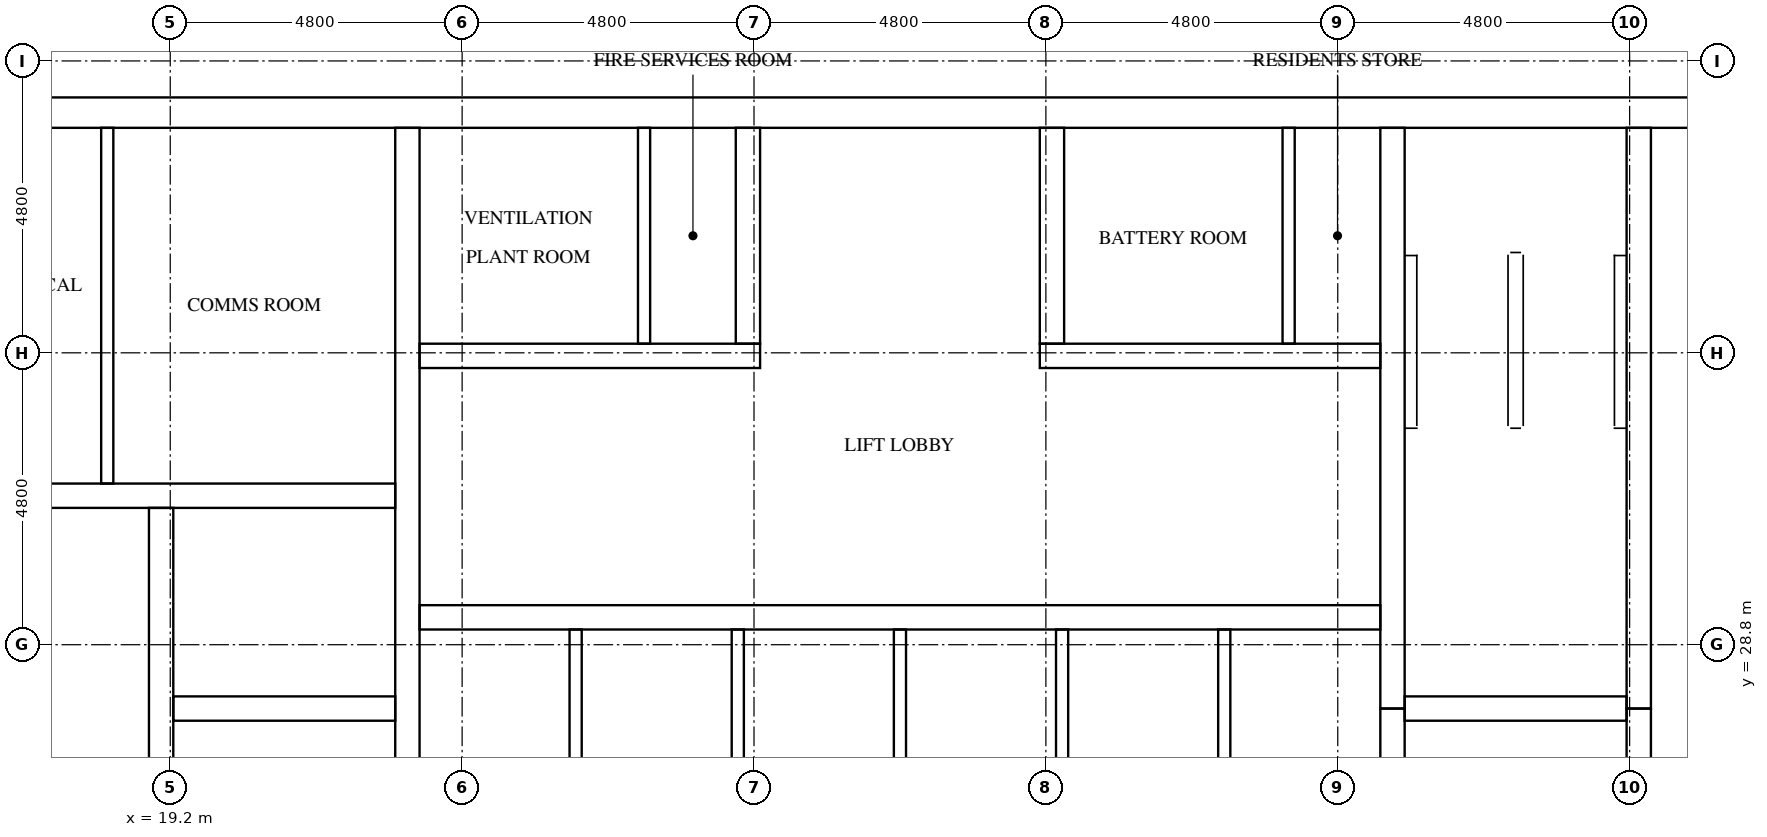
"""IFC4 building model, lengths in metres.
Left out: names, types, materials, properties, quantities, classifications, styles, units other than length and angle.
Written with IfcOpenShell. Run it as: python <this file> out.ifc"""

import sys

from ifc_helpers import new_model, si_unit, direction, frame, frame_2d, origin, place, context, subcontext, project, spatial, rectangle, extrude, element, fill, save


model = new_model("IFC4")
c1 = context("Model", 3, precision=1e-05, world=origin(), true_north=direction((0.0, 1.0)))
c2 = subcontext(c1, "Body", "Model", "MODEL_VIEW")
j1 = project(units=[si_unit("LENGTHUNIT", "METRE"), si_unit("PLANEANGLEUNIT", "RADIAN")], contexts=[c1])
p1 = place(None, origin())
s1 = spatial("IfcSite", under=j1, at=p1, CompositionType="ELEMENT")
p2 = place(p1, origin())
s2 = spatial("IfcBuilding", under=s1, at=p2, CompositionType="ELEMENT")
p3 = place(p2, frame((0.0, 0.0, 282.6)))
s3 = spatial("IfcBuildingStorey", under=s2, at=p3, CompositionType="ELEMENT", Elevation=282.6)
p4 = place(p3, frame((15.0, 37.55, 0.0), z_axis=(0.0, 0.0, 1.0), x_axis=(1.0, 0.0, 0.0)))
e1 = element("IfcWall", 1, at=p4, inside=s3, PredefinedType="SHEAR", context=c2, shape_type="SweptSolid", body=[
    extrude(rectangle(XDim=32.4, YDim=0.5, at=frame_2d((16.2, 0.0))), origin(), (0.0, 0.0, 1.0), 3.2),
])
p5 = place(p4, frame((15.3, 0.0, 0.0)))
e2 = element("IfcOpeningElement", 2, at=p5, cuts=e1, PredefinedType="OPENING", context=c2, shape_type="SweptSolid", body=[
    extrude(rectangle(XDim=1.8, YDim=2.1, at=frame_2d((0.9, 1.05))), frame((0.0, 0.26, 0.0), z_axis=(0.0, -1.0, 0.0), x_axis=(1.0, 0.0, 0.0)), (0.0, 0.0, 1.0), 0.52),
])
p6 = place(p4, frame((1.282, 0.0, 0.0)))
e3 = element("IfcOpeningElement", 3, at=p6, cuts=e1, PredefinedType="OPENING", context=c2, shape_type="SweptSolid", body=[
    extrude(rectangle(XDim=1.0, YDim=2.1, at=frame_2d((0.5, 1.05))), frame((0.0, 0.26, 0.0), z_axis=(0.0, -1.0, 0.0), x_axis=(1.0, 0.0, 0.0)), (0.0, 0.0, 1.0), 0.52),
])
p7 = place(p4, frame((5.082, 0.0, 0.0)))
e4 = element("IfcOpeningElement", 4, at=p7, cuts=e1, PredefinedType="OPENING", context=c2, shape_type="SweptSolid", body=[
    extrude(rectangle(XDim=1.0, YDim=2.1, at=frame_2d((0.5, 1.05))), frame((0.0, 0.26, 0.0), z_axis=(0.0, -1.0, 0.0), x_axis=(1.0, 0.0, 0.0)), (0.0, 0.0, 1.0), 0.52),
])
p8 = place(p3, frame((19.05, 15.5, 0.0), z_axis=(0.0, 0.0, 1.0), x_axis=(0.0, 1.0, 0.0)))
e5 = element("IfcWall", 5, at=p8, inside=s3, PredefinedType="SHEAR", context=c2, shape_type="SweptSolid", body=[
    extrude(rectangle(XDim=15.55, YDim=0.4, at=frame_2d((7.775, 0.0))), origin(), (0.0, 0.0, 1.0), 3.2),
])
p9 = place(p8, frame((9.95, 0.0, 0.0)))
e6 = element("IfcOpeningElement", 6, at=p9, cuts=e5, PredefinedType="OPENING", context=c2, shape_type="SweptSolid", body=[
    extrude(rectangle(XDim=1.1, YDim=2.1, at=frame_2d((0.55, 1.05))), frame((0.0, 0.21, 0.0), z_axis=(0.0, -1.0, 0.0), x_axis=(1.0, 0.0, 0.0)), (0.0, 0.0, 1.0), 0.42),
])
p10 = place(p8, frame((13.45, 0.0, 0.0)))
e7 = element("IfcOpeningElement", 7, at=p10, cuts=e5, PredefinedType="OPENING", context=c2, shape_type="SweptSolid", body=[
    extrude(rectangle(XDim=1.1, YDim=2.1, at=frame_2d((0.55, 1.05))), frame((0.0, 0.21, 0.0), z_axis=(0.0, -1.0, 0.0), x_axis=(1.0, 0.0, 0.0)), (0.0, 0.0, 1.0), 0.42),
])
p11 = place(p8, frame((0.7, 0.0, 0.0)))
e8 = element("IfcOpeningElement", 8, at=p11, cuts=e5, PredefinedType="OPENING", context=c2, shape_type="SweptSolid", body=[
    extrude(rectangle(XDim=1.2, YDim=2.1, at=frame_2d((0.6, 1.05))), frame((0.0, 0.21, 0.0), z_axis=(0.0, -1.0, 0.0), x_axis=(1.0, 0.0, 0.0)), (0.0, 0.0, 1.0), 0.42),
])
p12 = place(p3, frame((23.1, 15.5, 0.0), z_axis=(0.0, 0.0, 1.0), x_axis=(0.0, 1.0, 0.0)))
e9 = element("IfcWall", 9, at=p12, inside=s3, PredefinedType="SHEAR", context=c2, shape_type="SweptSolid", body=[
    extrude(rectangle(XDim=21.8, YDim=0.4, at=frame_2d((10.9, 0.0))), origin(), (0.0, 0.0, 1.0), 3.2),
])
p13 = place(p3, frame((39.3, 24.25, 0.0), z_axis=(0.0, 0.0, 1.0), x_axis=(0.0, 1.0, 0.0)))
e10 = element("IfcWall", 10, at=p13, inside=s3, PredefinedType="SHEAR", context=c2, shape_type="SweptSolid", body=[
    extrude(rectangle(XDim=3.5, YDim=0.4, at=frame_2d((1.75, 0.0))), origin(), (0.0, 0.0, 1.0), 3.2),
])
p14 = place(p3, frame((39.3, 27.75, 0.0), z_axis=(0.0, 0.0, 1.0), x_axis=(0.0, 1.0, 0.0)))
e11 = element("IfcWall", 11, at=p14, inside=s3, PredefinedType="SHEAR", context=c2, shape_type="SweptSolid", body=[
    extrude(rectangle(XDim=9.55, YDim=0.4, at=frame_2d((4.775, 0.0))), origin(), (0.0, 0.0, 1.0), 3.2),
])
p15 = place(p3, frame((43.35, 24.25, 0.0), z_axis=(0.0, 0.0, 1.0), x_axis=(0.0, 1.0, 0.0)))
e12 = element("IfcWall", 12, at=p15, inside=s3, PredefinedType="SHEAR", context=c2, shape_type="SweptSolid", body=[
    extrude(rectangle(XDim=3.5, YDim=0.4, at=frame_2d((1.75, 0.0))), origin(), (0.0, 0.0, 1.0), 3.2),
])
p16 = place(p15, frame((1.2, 0.0, 0.0)))
e13 = element("IfcOpeningElement", 13, at=p16, cuts=e12, PredefinedType="OPENING", context=c2, shape_type="SweptSolid", body=[
    extrude(rectangle(XDim=1.1, YDim=2.1, at=frame_2d((0.55, 1.05))), frame((0.0, 0.21, 0.0), z_axis=(0.0, -1.0, 0.0), x_axis=(1.0, 0.0, 0.0)), (0.0, 0.0, 1.0), 0.42),
])
p17 = place(p3, frame((43.35, 27.75, 0.0), z_axis=(0.0, 0.0, 1.0), x_axis=(0.0, 1.0, 0.0)))
e14 = element("IfcWall", 14, at=p17, inside=s3, PredefinedType="SHEAR", context=c2, shape_type="SweptSolid", body=[
    extrude(rectangle(XDim=9.55, YDim=0.4, at=frame_2d((4.775, 0.0))), origin(), (0.0, 0.0, 1.0), 3.2),
])
p18 = place(p17, frame((7.65, 0.0, 0.0)))
e15 = element("IfcOpeningElement", 15, at=p18, cuts=e14, PredefinedType="OPENING", context=c2, shape_type="SweptSolid", body=[
    extrude(rectangle(XDim=1.2, YDim=2.1, at=frame_2d((0.6, 1.05))), frame((0.0, 0.21, 0.0), z_axis=(0.0, -1.0, 0.0), x_axis=(1.0, 0.0, 0.0)), (0.0, 0.0, 1.0), 0.42),
])
p19 = place(p3, frame((19.25, 27.75, 0.0), z_axis=(0.0, 0.0, 1.0), x_axis=(1.0, 0.0, 0.0)))
e16 = element("IfcWall", 16, at=p19, inside=s3, PredefinedType="SHEAR", context=c2, shape_type="SweptSolid", body=[
    extrude(rectangle(XDim=3.65, YDim=0.4, at=frame_2d((1.825, 0.0))), origin(), (0.0, 0.0, 1.0), 3.2),
])
p20 = place(p3, frame((15.5, 31.25, 0.0), z_axis=(0.0, 0.0, 1.0), x_axis=(1.0, 0.0, 0.0)))
e17 = element("IfcWall", 17, at=p20, inside=s3, PredefinedType="SHEAR", context=c2, shape_type="SweptSolid", body=[
    extrude(rectangle(XDim=7.4, YDim=0.4, at=frame_2d((3.7, 0.0))), origin(), (0.0, 0.0, 1.0), 3.2),
])
p21 = place(p3, frame((39.5, 27.75, 0.0), z_axis=(0.0, 0.0, 1.0), x_axis=(1.0, 0.0, 0.0)))
e18 = element("IfcWall", 18, at=p21, inside=s3, PredefinedType="SHEAR", context=c2, shape_type="SweptSolid", body=[
    extrude(rectangle(XDim=3.65, YDim=0.4, at=frame_2d((1.825, 0.0))), origin(), (0.0, 0.0, 1.0), 3.2),
])
p22 = place(p3, frame((23.3, 29.25, 0.0), z_axis=(0.0, 0.0, 1.0), x_axis=(1.0, 0.0, 0.0)))
e19 = element("IfcWall", 19, at=p22, inside=s3, PredefinedType="SHEAR", context=c2, shape_type="SweptSolid", body=[
    extrude(rectangle(XDim=15.8, YDim=0.4, at=frame_2d((7.9, 0.0))), origin(), (0.0, 0.0, 1.0), 3.2),
])
p23 = place(p22, frame((0.683, 0.0, 0.0)))
e20 = element("IfcOpeningElement", 20, at=p23, cuts=e19, PredefinedType="OPENING", context=c2, shape_type="SweptSolid", body=[
    extrude(rectangle(XDim=1.1, YDim=2.1, at=frame_2d((0.55, 1.05))), frame((0.0, 0.21, 0.0), z_axis=(0.0, -1.0, 0.0), x_axis=(1.0, 0.0, 0.0)), (0.0, 0.0, 1.0), 0.42),
])
p24 = place(p22, frame((3.35, 0.0, 0.0)))
e21 = element("IfcOpeningElement", 21, at=p24, cuts=e19, PredefinedType="OPENING", context=c2, shape_type="SweptSolid", body=[
    extrude(rectangle(XDim=1.1, YDim=2.1, at=frame_2d((0.55, 1.05))), frame((0.0, 0.21, 0.0), z_axis=(0.0, -1.0, 0.0), x_axis=(1.0, 0.0, 0.0)), (0.0, 0.0, 1.0), 0.42),
])
p25 = place(p22, frame((6.017, 0.0, 0.0)))
e22 = element("IfcOpeningElement", 22, at=p25, cuts=e19, PredefinedType="OPENING", context=c2, shape_type="SweptSolid", body=[
    extrude(rectangle(XDim=1.1, YDim=2.1, at=frame_2d((0.55, 1.05))), frame((0.0, 0.21, 0.0), z_axis=(0.0, -1.0, 0.0), x_axis=(1.0, 0.0, 0.0)), (0.0, 0.0, 1.0), 0.42),
])
p26 = place(p22, frame((8.683, 0.0, 0.0)))
e23 = element("IfcOpeningElement", 23, at=p26, cuts=e19, PredefinedType="OPENING", context=c2, shape_type="SweptSolid", body=[
    extrude(rectangle(XDim=1.1, YDim=2.1, at=frame_2d((0.55, 1.05))), frame((0.0, 0.21, 0.0), z_axis=(0.0, -1.0, 0.0), x_axis=(1.0, 0.0, 0.0)), (0.0, 0.0, 1.0), 0.42),
])
p27 = place(p22, frame((11.35, 0.0, 0.0)))
e24 = element("IfcOpeningElement", 24, at=p27, cuts=e19, PredefinedType="OPENING", context=c2, shape_type="SweptSolid", body=[
    extrude(rectangle(XDim=1.1, YDim=2.1, at=frame_2d((0.55, 1.05))), frame((0.0, 0.21, 0.0), z_axis=(0.0, -1.0, 0.0), x_axis=(1.0, 0.0, 0.0)), (0.0, 0.0, 1.0), 0.42),
])
p28 = place(p22, frame((14.017, 0.0, 0.0)))
e25 = element("IfcOpeningElement", 25, at=p28, cuts=e19, PredefinedType="OPENING", context=c2, shape_type="SweptSolid", body=[
    extrude(rectangle(XDim=1.1, YDim=2.1, at=frame_2d((0.55, 1.05))), frame((0.0, 0.21, 0.0), z_axis=(0.0, -1.0, 0.0), x_axis=(1.0, 0.0, 0.0)), (0.0, 0.0, 1.0), 0.42),
])
p29 = place(p3, frame((23.3, 33.55, 0.0), z_axis=(0.0, 0.0, 1.0), x_axis=(1.0, 0.0, 0.0)))
e26 = element("IfcWall", 26, at=p29, inside=s3, PredefinedType="SHEAR", context=c2, shape_type="SweptSolid", body=[
    extrude(rectangle(XDim=5.6, YDim=0.4, at=frame_2d((2.8, 0.0))), origin(), (0.0, 0.0, 1.0), 3.2),
])
p30 = place(p29, frame((1.296, 0.0, 0.0)))
e27 = element("IfcOpeningElement", 27, at=p30, cuts=e26, PredefinedType="OPENING", context=c2, shape_type="SweptSolid", body=[
    extrude(rectangle(XDim=1.0, YDim=2.1, at=frame_2d((0.5, 1.05))), frame((0.0, 0.21, 0.0), z_axis=(0.0, -1.0, 0.0), x_axis=(1.0, 0.0, 0.0)), (0.0, 0.0, 1.0), 0.42),
])
p31 = place(p29, frame((3.996, 0.0, 0.0)))
e28 = element("IfcOpeningElement", 28, at=p31, cuts=e26, PredefinedType="OPENING", context=c2, shape_type="SweptSolid", body=[
    extrude(rectangle(XDim=1.0, YDim=2.1, at=frame_2d((0.5, 1.05))), frame((0.0, 0.21, 0.0), z_axis=(0.0, -1.0, 0.0), x_axis=(1.0, 0.0, 0.0)), (0.0, 0.0, 1.0), 0.42),
])
p32 = place(p3, frame((33.5, 33.55, 0.0), z_axis=(0.0, 0.0, 1.0), x_axis=(1.0, 0.0, 0.0)))
e29 = element("IfcWall", 29, at=p32, inside=s3, PredefinedType="SHEAR", context=c2, shape_type="SweptSolid", body=[
    extrude(rectangle(XDim=5.6, YDim=0.4, at=frame_2d((2.8, 0.0))), origin(), (0.0, 0.0, 1.0), 3.2),
])
p33 = place(p32, frame((1.696, 0.0, 0.0)))
e30 = element("IfcOpeningElement", 30, at=p33, cuts=e29, PredefinedType="OPENING", context=c2, shape_type="SweptSolid", body=[
    extrude(rectangle(XDim=1.0, YDim=2.1, at=frame_2d((0.5, 1.05))), frame((0.0, 0.21, 0.0), z_axis=(0.0, -1.0, 0.0), x_axis=(1.0, 0.0, 0.0)), (0.0, 0.0, 1.0), 0.42),
])
p34 = place(p32, frame((4.396, 0.0, 0.0)))
e31 = element("IfcOpeningElement", 31, at=p34, cuts=e29, PredefinedType="OPENING", context=c2, shape_type="SweptSolid", body=[
    extrude(rectangle(XDim=1.0, YDim=2.1, at=frame_2d((0.5, 1.05))), frame((0.0, 0.21, 0.0), z_axis=(0.0, -1.0, 0.0), x_axis=(1.0, 0.0, 0.0)), (0.0, 0.0, 1.0), 0.42),
])
for number, where, z_axis, x_axis in (
    (32, (28.7, 33.75, 0.0), (0.0, 0.0, 1.0), (0.0, 1.0, 0.0)),
    (33, (33.7, 33.75, 0.0), (0.0, 0.0, 1.0), (0.0, 1.0, 0.0)),
):
    element("IfcWall", number, at=place(p3, frame(where, z_axis=z_axis, x_axis=x_axis)), inside=s3, PredefinedType="SHEAR", context=c2, shape_type="SweptSolid", body=[
        extrude(rectangle(XDim=3.55, YDim=0.4, at=frame_2d((1.775, 0.0))), origin(), (0.0, 0.0, 1.0), 3.2),
    ])
for number, where, z_axis, x_axis in (
    (34, (25.867, 26.35, 0.0), (0.0, 0.0, 1.0), (0.0, 1.0, 0.0)),
    (35, (28.533, 26.35, 0.0), (0.0, 0.0, 1.0), (0.0, 1.0, 0.0)),
    (36, (31.2, 26.35, 0.0), (0.0, 0.0, 1.0), (0.0, 1.0, 0.0)),
    (37, (33.867, 26.35, 0.0), (0.0, 0.0, 1.0), (0.0, 1.0, 0.0)),
    (38, (36.533, 26.35, 0.0), (0.0, 0.0, 1.0), (0.0, 1.0, 0.0)),
):
    element("IfcWall", number, at=place(p3, frame(where, z_axis=z_axis, x_axis=x_axis)), inside=s3, PredefinedType="SOLIDWALL", context=c2, shape_type="SweptSolid", body=[
        extrude(rectangle(XDim=2.7, YDim=0.2, at=frame_2d((1.35, 0.0))), origin(), (0.0, 0.0, 1.0), 3.2),
    ])
p35 = place(p3, frame((18.164, 31.45, 0.0), z_axis=(0.0, 0.0, 1.0), x_axis=(0.0, 1.0, 0.0)))
e39 = element("IfcWall", 39, at=p35, inside=s3, PredefinedType="PARTITIONING", context=c2, shape_type="SweptSolid", body=[
    extrude(rectangle(XDim=5.85, YDim=0.2, at=frame_2d((2.925, 0.0))), origin(), (0.0, 0.0, 1.0), 3.2),
])
for number, where, z_axis, x_axis in (
    (40, (26.992, 33.75, 0.0), (0.0, 0.0, 1.0), (0.0, 1.0, 0.0)),
    (41, (37.592, 33.75, 0.0), (0.0, 0.0, 1.0), (0.0, 1.0, 0.0)),
):
    element("IfcWall", number, at=place(p3, frame(where, z_axis=z_axis, x_axis=x_axis)), inside=s3, PredefinedType="PARTITIONING", context=c2, shape_type="SweptSolid", body=[
        extrude(rectangle(XDim=3.55, YDim=0.2, at=frame_2d((1.775, 0.0))), origin(), (0.0, 0.0, 1.0), 3.2),
    ])
p36 = place(p23, origin())
e42 = element("IfcDoor", 42, at=p36, inside=s3, OperationType="DOUBLE_DOOR_SLIDING", PredefinedType="DOOR", context=c2, shape_type="SweptSolid", body=[
    extrude(rectangle(XDim=1.1, YDim=2.1, at=frame_2d((0.55, 1.05))), frame((0.0, 0.025, 0.0), z_axis=(0.0, -1.0, 0.0), x_axis=(1.0, 0.0, 0.0)), (0.0, 0.0, 1.0), 0.05),
])
fill(e20, e42)
p37 = place(p24, origin())
e43 = element("IfcDoor", 43, at=p37, inside=s3, OperationType="DOUBLE_DOOR_SLIDING", PredefinedType="DOOR", context=c2, shape_type="SweptSolid", body=[
    extrude(rectangle(XDim=1.1, YDim=2.1, at=frame_2d((0.55, 1.05))), frame((0.0, 0.025, 0.0), z_axis=(0.0, -1.0, 0.0), x_axis=(1.0, 0.0, 0.0)), (0.0, 0.0, 1.0), 0.05),
])
fill(e21, e43)
p38 = place(p25, origin())
e44 = element("IfcDoor", 44, at=p38, inside=s3, OperationType="DOUBLE_DOOR_SLIDING", PredefinedType="DOOR", context=c2, shape_type="SweptSolid", body=[
    extrude(rectangle(XDim=1.1, YDim=2.1, at=frame_2d((0.55, 1.05))), frame((0.0, 0.025, 0.0), z_axis=(0.0, -1.0, 0.0), x_axis=(1.0, 0.0, 0.0)), (0.0, 0.0, 1.0), 0.05),
])
fill(e22, e44)
p39 = place(p26, origin())
e45 = element("IfcDoor", 45, at=p39, inside=s3, OperationType="DOUBLE_DOOR_SLIDING", PredefinedType="DOOR", context=c2, shape_type="SweptSolid", body=[
    extrude(rectangle(XDim=1.1, YDim=2.1, at=frame_2d((0.55, 1.05))), frame((0.0, 0.025, 0.0), z_axis=(0.0, -1.0, 0.0), x_axis=(1.0, 0.0, 0.0)), (0.0, 0.0, 1.0), 0.05),
])
fill(e23, e45)
p40 = place(p27, origin())
e46 = element("IfcDoor", 46, at=p40, inside=s3, OperationType="DOUBLE_DOOR_SLIDING", PredefinedType="DOOR", context=c2, shape_type="SweptSolid", body=[
    extrude(rectangle(XDim=1.1, YDim=2.1, at=frame_2d((0.55, 1.05))), frame((0.0, 0.025, 0.0), z_axis=(0.0, -1.0, 0.0), x_axis=(1.0, 0.0, 0.0)), (0.0, 0.0, 1.0), 0.05),
])
fill(e24, e46)
p41 = place(p28, origin())
e47 = element("IfcDoor", 47, at=p41, inside=s3, OperationType="DOUBLE_DOOR_SLIDING", PredefinedType="DOOR", context=c2, shape_type="SweptSolid", body=[
    extrude(rectangle(XDim=1.1, YDim=2.1, at=frame_2d((0.55, 1.05))), frame((0.0, 0.025, 0.0), z_axis=(0.0, -1.0, 0.0), x_axis=(1.0, 0.0, 0.0)), (0.0, 0.0, 1.0), 0.05),
])
fill(e25, e47)
p42 = place(p10, origin())
e48 = element("IfcDoor", 48, at=p42, inside=s3, OperationType="DOUBLE_DOOR_SLIDING", PredefinedType="DOOR", context=c2, shape_type="SweptSolid", body=[
    extrude(rectangle(XDim=1.1, YDim=2.1, at=frame_2d((0.55, 1.05))), frame((0.0, 0.025, 0.0), z_axis=(0.0, -1.0, 0.0), x_axis=(1.0, 0.0, 0.0)), (0.0, 0.0, 1.0), 0.05),
])
fill(e7, e48)
p43 = place(p18, origin())
e49 = element("IfcDoor", 49, at=p43, inside=s3, OperationType="SINGLE_SWING_RIGHT", PredefinedType="DOOR", context=c2, shape_type="SweptSolid", body=[
    extrude(rectangle(XDim=1.2, YDim=2.1, at=frame_2d((0.6, 1.05))), frame((0.0, 0.025, 0.0), z_axis=(0.0, -1.0, 0.0), x_axis=(1.0, 0.0, 0.0)), (0.0, 0.0, 1.0), 0.05),
])
fill(e15, e49)
p44 = place(p5, origin())
e50 = element("IfcDoor", 50, at=p44, inside=s3, OperationType="DOUBLE_DOOR_SINGLE_SWING", PredefinedType="DOOR", context=c2, shape_type="SweptSolid", body=[
    extrude(rectangle(XDim=1.8, YDim=2.1, at=frame_2d((0.9, 1.05))), frame((0.0, 0.025, 0.0), z_axis=(0.0, -1.0, 0.0), x_axis=(1.0, 0.0, 0.0)), (0.0, 0.0, 1.0), 0.05),
])
fill(e2, e50)
p45 = place(p6, origin())
e51 = element("IfcDoor", 51, at=p45, inside=s3, OperationType="SINGLE_SWING_LEFT", PredefinedType="DOOR", context=c2, shape_type="SweptSolid", body=[
    extrude(rectangle(XDim=1.0, YDim=2.1, at=frame_2d((0.5, 1.05))), frame((0.0, 0.025, 0.0), z_axis=(0.0, -1.0, 0.0), x_axis=(1.0, 0.0, 0.0)), (0.0, 0.0, 1.0), 0.05),
])
fill(e3, e51)
p46 = place(p7, origin())
e52 = element("IfcDoor", 52, at=p46, inside=s3, OperationType="SINGLE_SWING_RIGHT", PredefinedType="DOOR", context=c2, shape_type="SweptSolid", body=[
    extrude(rectangle(XDim=1.0, YDim=2.1, at=frame_2d((0.5, 1.05))), frame((0.0, 0.025, 0.0), z_axis=(0.0, -1.0, 0.0), x_axis=(1.0, 0.0, 0.0)), (0.0, 0.0, 1.0), 0.05),
])
fill(e4, e52)
p47 = place(p30, frame((1.0, 0.0, 0.0), z_axis=(0.0, 0.0, 1.0), x_axis=(-1.0, 0.0, 0.0)))
e53 = element("IfcDoor", 53, at=p47, inside=s3, OperationType="SINGLE_SWING_RIGHT", PredefinedType="DOOR", context=c2, shape_type="SweptSolid", body=[
    extrude(rectangle(XDim=1.0, YDim=2.1, at=frame_2d((0.5, 1.05))), frame((0.0, 0.025, 0.0), z_axis=(0.0, -1.0, 0.0), x_axis=(1.0, 0.0, 0.0)), (0.0, 0.0, 1.0), 0.05),
])
fill(e27, e53)
p48 = place(p31, frame((1.0, 0.0, 0.0), z_axis=(0.0, 0.0, 1.0), x_axis=(-1.0, 0.0, 0.0)))
e54 = element("IfcDoor", 54, at=p48, inside=s3, OperationType="SINGLE_SWING_LEFT", PredefinedType="DOOR", context=c2, shape_type="SweptSolid", body=[
    extrude(rectangle(XDim=1.0, YDim=2.1, at=frame_2d((0.5, 1.05))), frame((0.0, 0.025, 0.0), z_axis=(0.0, -1.0, 0.0), x_axis=(1.0, 0.0, 0.0)), (0.0, 0.0, 1.0), 0.05),
])
fill(e28, e54)
p49 = place(p33, frame((1.0, 0.0, 0.0), z_axis=(0.0, 0.0, 1.0), x_axis=(-1.0, 0.0, 0.0)))
e55 = element("IfcDoor", 55, at=p49, inside=s3, OperationType="SINGLE_SWING_RIGHT", PredefinedType="DOOR", context=c2, shape_type="SweptSolid", body=[
    extrude(rectangle(XDim=1.0, YDim=2.1, at=frame_2d((0.5, 1.05))), frame((0.0, 0.025, 0.0), z_axis=(0.0, -1.0, 0.0), x_axis=(1.0, 0.0, 0.0)), (0.0, 0.0, 1.0), 0.05),
])
fill(e30, e55)
p50 = place(p34, frame((1.0, 0.0, 0.0), z_axis=(0.0, 0.0, 1.0), x_axis=(-1.0, 0.0, 0.0)))
e56 = element("IfcDoor", 56, at=p50, inside=s3, OperationType="SINGLE_SWING_LEFT", PredefinedType="DOOR", context=c2, shape_type="SweptSolid", body=[
    extrude(rectangle(XDim=1.0, YDim=2.1, at=frame_2d((0.5, 1.05))), frame((0.0, 0.025, 0.0), z_axis=(0.0, -1.0, 0.0), x_axis=(1.0, 0.0, 0.0)), (0.0, 0.0, 1.0), 0.05),
])
fill(e31, e56)
save(model, sys.argv[1])
